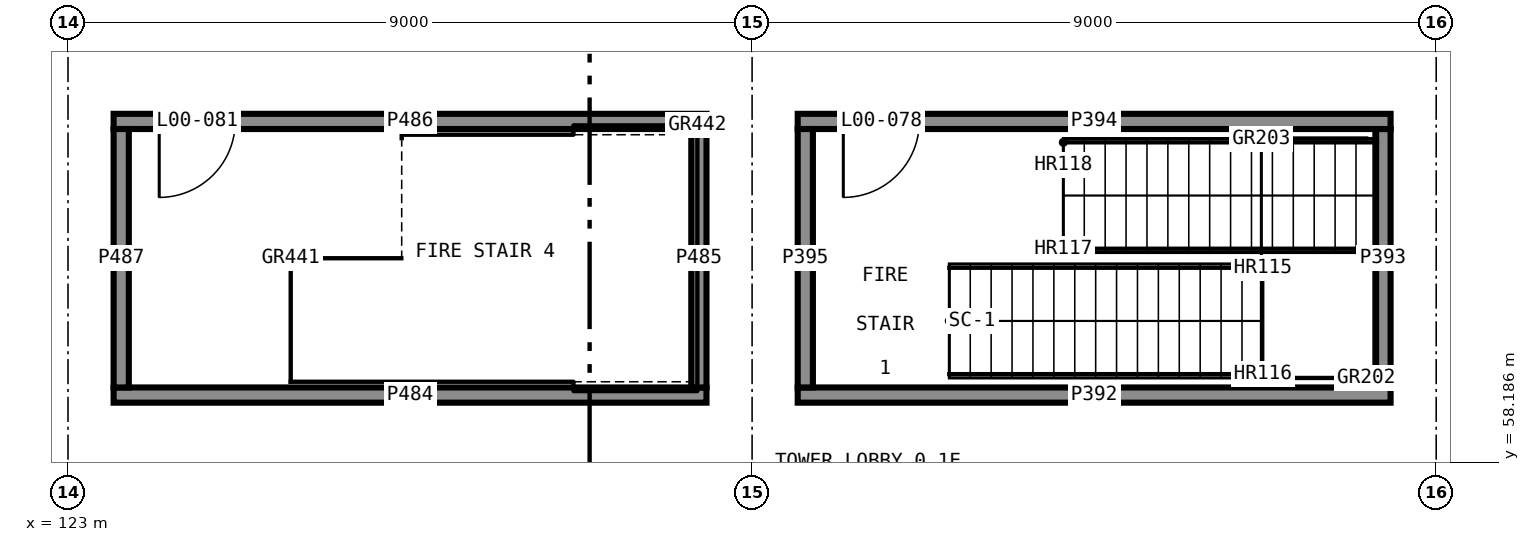
"""IFC4 building model, lengths in metres.
Left out: names, types, materials, properties, quantities, classifications, styles, units other than length and angle.
Written with IfcOpenShell. Run it as: python <this file> out.ifc"""

import sys

from ifc_helpers import new_model, si_unit, direction, frame, frame_2d, origin, place, context, subcontext, project, spatial, rectangle, extrude, element, fill, save


model = new_model("IFC4")
c1 = context("Model", 3, precision=1e-05, world=origin(), true_north=direction((0.0, 1.0)))
c2 = subcontext(c1, "Body", "Model", "MODEL_VIEW")
j1 = project(units=[si_unit("LENGTHUNIT", "METRE"), si_unit("PLANEANGLEUNIT", "RADIAN")], contexts=[c1])
p1 = place(None, origin())
s1 = spatial("IfcSite", under=j1, at=p1, CompositionType="ELEMENT")
p2 = place(p1, origin())
s2 = spatial("IfcBuilding", under=s1, at=p2, CompositionType="ELEMENT")
p3 = place(p2, origin())
s3 = spatial("IfcBuildingStorey", under=s2, at=p3, CompositionType="ELEMENT", Elevation=0.0)
p4 = place(p3, frame((132.6, 59.075, 0.0), z_axis=(0.0, 0.0, 1.0), x_axis=(1.0, 0.0, 0.0)))
e1 = element("IfcWall", 1, at=p4, inside=s3, PredefinedType="SHEAR", context=c2, shape_type="SweptSolid", body=[
    extrude(rectangle(XDim=7.8, YDim=0.2, at=frame_2d((3.9, 0.0))), origin(), (0.0, 0.0, 1.0), 5.25),
])
p5 = place(p3, frame((140.3, 59.175, 0.0), z_axis=(0.0, 0.0, 1.0), x_axis=(0.0, 1.0, 0.0)))
e2 = element("IfcWall", 2, at=p5, inside=s3, PredefinedType="SHEAR", context=c2, shape_type="SweptSolid", body=[
    extrude(rectangle(XDim=3.4, YDim=0.2, at=frame_2d((1.7, 0.0))), origin(), (0.0, 0.0, 1.0), 5.25),
])
p6 = place(p3, frame((140.4, 62.675, 0.0), z_axis=(0.0, 0.0, 1.0), x_axis=(-1.0, 0.0, 0.0)))
e3 = element("IfcWall", 3, at=p6, inside=s3, PredefinedType="SHEAR", context=c2, shape_type="SweptSolid", body=[
    extrude(rectangle(XDim=7.8, YDim=0.2, at=frame_2d((3.9, 0.0))), origin(), (0.0, 0.0, 1.0), 5.25),
])
p7 = place(p6, frame((6.2, 0.0, 0.0)))
e4 = element("IfcOpeningElement", 4, at=p7, cuts=e3, PredefinedType="OPENING", context=c2, shape_type="SweptSolid", body=[
    extrude(rectangle(XDim=1.0, YDim=2.1, at=frame_2d((0.5, 1.05))), frame((0.0, 0.11, 0.0), z_axis=(0.0, -1.0, 0.0), x_axis=(1.0, 0.0, 0.0)), (0.0, 0.0, 1.0), 0.22),
])
p8 = place(p3, frame((132.7, 62.575, 0.0), z_axis=(0.0, 0.0, 1.0), x_axis=(0.0, -1.0, 0.0)))
e5 = element("IfcWall", 5, at=p8, inside=s3, PredefinedType="SHEAR", context=c2, shape_type="SweptSolid", body=[
    extrude(rectangle(XDim=3.4, YDim=0.2, at=frame_2d((1.7, 0.0))), origin(), (0.0, 0.0, 1.0), 5.25),
])
p9 = place(p3, frame((123.6, 59.075, 0.0), z_axis=(0.0, 0.0, 1.0), x_axis=(1.0, 0.0, 0.0)))
e6 = element("IfcWall", 6, at=p9, inside=s3, PredefinedType="SHEAR", context=c2, shape_type="SweptSolid", body=[
    extrude(rectangle(XDim=7.8, YDim=0.2, at=frame_2d((3.9, 0.0))), origin(), (0.0, 0.0, 1.0), 5.25),
])
p10 = place(p3, frame((131.3, 59.175, 0.0), z_axis=(0.0, 0.0, 1.0), x_axis=(0.0, 1.0, 0.0)))
e7 = element("IfcWall", 7, at=p10, inside=s3, PredefinedType="SHEAR", context=c2, shape_type="SweptSolid", body=[
    extrude(rectangle(XDim=3.4, YDim=0.2, at=frame_2d((1.7, 0.0))), origin(), (0.0, 0.0, 1.0), 5.25),
])
p11 = place(p3, frame((131.4, 62.675, 0.0), z_axis=(0.0, 0.0, 1.0), x_axis=(-1.0, 0.0, 0.0)))
e8 = element("IfcWall", 8, at=p11, inside=s3, PredefinedType="SHEAR", context=c2, shape_type="SweptSolid", body=[
    extrude(rectangle(XDim=7.8, YDim=0.2, at=frame_2d((3.9, 0.0))), origin(), (0.0, 0.0, 1.0), 5.25),
])
p12 = place(p11, frame((6.2, 0.0, 0.0)))
e9 = element("IfcOpeningElement", 9, at=p12, cuts=e8, PredefinedType="OPENING", context=c2, shape_type="SweptSolid", body=[
    extrude(rectangle(XDim=1.0, YDim=2.1, at=frame_2d((0.5, 1.05))), frame((0.0, 0.11, 0.0), z_axis=(0.0, -1.0, 0.0), x_axis=(1.0, 0.0, 0.0)), (0.0, 0.0, 1.0), 0.22),
])
p13 = place(p3, frame((123.7, 62.575, 0.0), z_axis=(0.0, 0.0, 1.0), x_axis=(0.0, -1.0, 0.0)))
e10 = element("IfcWall", 10, at=p13, inside=s3, PredefinedType="SHEAR", context=c2, shape_type="SweptSolid", body=[
    extrude(rectangle(XDim=3.4, YDim=0.2, at=frame_2d((1.7, 0.0))), origin(), (0.0, 0.0, 1.0), 5.25),
])
p14 = place(p7, origin())
e11 = element("IfcDoor", 11, at=p14, inside=s3, OperationType="SINGLE_SWING_LEFT", PredefinedType="DOOR", context=c2, shape_type="SweptSolid", body=[
    extrude(rectangle(XDim=1.0, YDim=2.1, at=frame_2d((0.5, 1.05))), frame((0.0, 0.025, 0.0), z_axis=(0.0, -1.0, 0.0), x_axis=(1.0, 0.0, 0.0)), (0.0, 0.0, 1.0), 0.05),
])
fill(e4, e11)
p15 = place(p12, origin())
e12 = element("IfcDoor", 12, at=p15, inside=s3, OperationType="SINGLE_SWING_LEFT", PredefinedType="DOOR", context=c2, shape_type="SweptSolid", body=[
    extrude(rectangle(XDim=1.0, YDim=2.1, at=frame_2d((0.5, 1.05))), frame((0.0, 0.025, 0.0), z_axis=(0.0, -1.0, 0.0), x_axis=(1.0, 0.0, 0.0)), (0.0, 0.0, 1.0), 0.05),
])
fill(e9, e12)
save(model, sys.argv[1])
